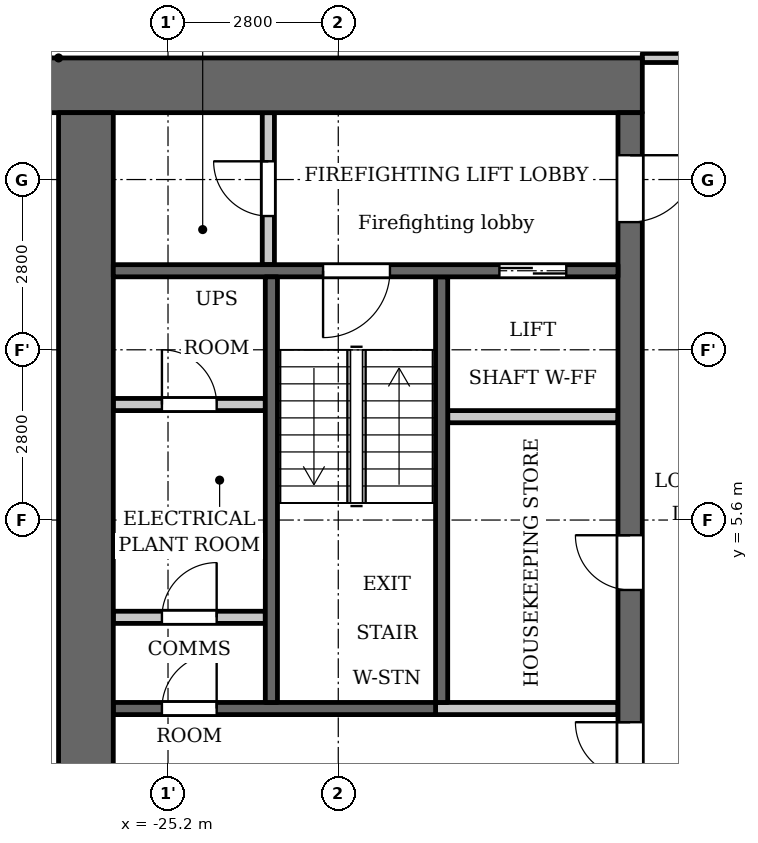
"""IFC4 building model, lengths in metres.
Left out: names, types, materials, properties, quantities, classifications, styles, units other than length and angle.
Written with IfcOpenShell. Run it as: python <this file> out.ifc"""

import sys

from ifc_helpers import new_model, si_unit, direction, frame, frame_2d, origin, place, context, subcontext, project, spatial, rectangle, extrude, element, fill, save


model = new_model("IFC4")
c1 = context("Model", 3, precision=1e-05, world=origin(), true_north=direction((0.0, 1.0)))
c2 = subcontext(c1, "Body", "Model", "MODEL_VIEW")
j1 = project(units=[si_unit("LENGTHUNIT", "METRE"), si_unit("PLANEANGLEUNIT", "RADIAN")], contexts=[c1])
p1 = place(None, origin())
s1 = spatial("IfcSite", under=j1, at=p1, CompositionType="ELEMENT")
p2 = place(p1, origin())
s2 = spatial("IfcBuilding", under=s1, at=p2, CompositionType="ELEMENT")
p3 = place(p2, frame((0.0, 0.0, 111.3)))
s3 = spatial("IfcBuildingStorey", under=s2, at=p3, CompositionType="ELEMENT", Elevation=111.3)
p4 = place(p3, frame((-20.7, 2.6, 0.0), z_axis=(0.0, 0.0, 1.0), x_axis=(0.0, 1.0, 0.0)))
e1 = element("IfcWall", 1, at=p4, inside=s3, PredefinedType="SHEAR", context=c2, shape_type="SweptSolid", body=[
    extrude(rectangle(XDim=7.0, YDim=0.2, at=frame_2d((3.5, 0.0))), origin(), (0.0, 0.0, 1.0), 3.2),
])
p5 = place(p3, frame((-20.8, 2.5, 0.0), z_axis=(0.0, 0.0, 1.0), x_axis=(-1.0, 0.0, 0.0)))
e2 = element("IfcWall", 2, at=p5, inside=s3, PredefinedType="SHEAR", context=c2, shape_type="SweptSolid", body=[
    extrude(rectangle(XDim=5.3, YDim=0.2, at=frame_2d((2.65, 0.0))), origin(), (0.0, 0.0, 1.0), 3.2),
])
p6 = place(p5, frame((3.6, 0.0, 0.0)))
e3 = element("IfcOpeningElement", 3, at=p6, cuts=e2, PredefinedType="OPENING", context=c2, shape_type="SweptSolid", body=[
    extrude(rectangle(XDim=0.9, YDim=2.1, at=frame_2d((0.45, 1.05))), frame((0.0, 0.11, 0.0), z_axis=(0.0, -1.0, 0.0), x_axis=(1.0, 0.0, 0.0)), (0.0, 0.0, 1.0), 0.22),
])
p7 = place(p3, frame((-17.4, 12.75, 0.0), z_axis=(0.0, 0.0, 1.0), x_axis=(-1.0, 0.0, 0.0)))
e4 = element("IfcWall", 4, at=p7, inside=s3, PredefinedType="SHEAR", context=c2, shape_type="SweptSolid", body=[
    extrude(rectangle(XDim=10.4, YDim=0.9, at=frame_2d((5.2, 0.0))), origin(), (0.0, 0.0, 1.0), 3.2),
])
p8 = place(p3, frame((-17.6, -12.3, 0.0), z_axis=(0.0, 0.0, 1.0), x_axis=(0.0, 1.0, 0.0)))
e5 = element("IfcWall", 5, at=p8, inside=s3, PredefinedType="SHEAR", context=c2, shape_type="SweptSolid", body=[
    extrude(rectangle(XDim=24.6, YDim=0.4, at=frame_2d((12.3, 0.0))), origin(), (0.0, 0.0, 1.0), 3.2),
])
p9 = place(p8, frame((6.0, 0.0, 0.0)))
e6 = element("IfcOpeningElement", 6, at=p9, cuts=e5, PredefinedType="OPENING", context=c2, shape_type="SweptSolid", body=[
    extrude(rectangle(XDim=1.1, YDim=2.1, at=frame_2d((0.55, 1.05))), frame((0.0, 0.21, 0.0), z_axis=(0.0, -1.0, 0.0), x_axis=(1.0, 0.0, 0.0)), (0.0, 0.0, 1.0), 0.42),
])
p10 = place(p8, frame((8.4, 0.0, 0.0)))
e7 = element("IfcOpeningElement", 7, at=p10, cuts=e5, PredefinedType="OPENING", context=c2, shape_type="SweptSolid", body=[
    extrude(rectangle(XDim=1.1, YDim=2.1, at=frame_2d((0.55, 1.05))), frame((0.0, 0.21, 0.0), z_axis=(0.0, -1.0, 0.0), x_axis=(1.0, 0.0, 0.0)), (0.0, 0.0, 1.0), 0.42),
])
p11 = place(p8, frame((10.8, 0.0, 0.0)))
e8 = element("IfcOpeningElement", 8, at=p11, cuts=e5, PredefinedType="OPENING", context=c2, shape_type="SweptSolid", body=[
    extrude(rectangle(XDim=1.1, YDim=2.1, at=frame_2d((0.55, 1.05))), frame((0.0, 0.21, 0.0), z_axis=(0.0, -1.0, 0.0), x_axis=(1.0, 0.0, 0.0)), (0.0, 0.0, 1.0), 0.42),
])
p12 = place(p8, frame((16.75, 0.0, 0.0)))
e9 = element("IfcOpeningElement", 9, at=p12, cuts=e5, PredefinedType="OPENING", context=c2, shape_type="SweptSolid", body=[
    extrude(rectangle(XDim=0.9, YDim=2.1, at=frame_2d((0.45, 1.05))), frame((0.0, 0.21, 0.0), z_axis=(0.0, -1.0, 0.0), x_axis=(1.0, 0.0, 0.0)), (0.0, 0.0, 1.0), 0.42),
])
p13 = place(p8, frame((22.8, 0.0, 0.0)))
e10 = element("IfcOpeningElement", 10, at=p13, cuts=e5, PredefinedType="OPENING", context=c2, shape_type="SweptSolid", body=[
    extrude(rectangle(XDim=1.1, YDim=2.1, at=frame_2d((0.55, 1.05))), frame((0.0, 0.21, 0.0), z_axis=(0.0, -1.0, 0.0), x_axis=(1.0, 0.0, 0.0)), (0.0, 0.0, 1.0), 0.42),
])
p14 = place(p8, frame((0.7, 0.0, 0.0)))
e11 = element("IfcOpeningElement", 11, at=p14, cuts=e5, PredefinedType="OPENING", context=c2, shape_type="SweptSolid", body=[
    extrude(rectangle(XDim=1.1, YDim=2.1, at=frame_2d((0.55, 1.05))), frame((0.0, 0.21, 0.0), z_axis=(0.0, -1.0, 0.0), x_axis=(1.0, 0.0, 0.0)), (0.0, 0.0, 1.0), 0.42),
])
p15 = place(p8, frame((12.775, 0.0, 0.0)))
e12 = element("IfcOpeningElement", 12, at=p15, cuts=e5, PredefinedType="OPENING", context=c2, shape_type="SweptSolid", body=[
    extrude(rectangle(XDim=1.8, YDim=2.1, at=frame_2d((0.9, 1.05))), frame((0.0, 0.21, 0.0), z_axis=(0.0, -1.0, 0.0), x_axis=(1.0, 0.0, 0.0)), (0.0, 0.0, 1.0), 0.42),
])
p16 = place(p3, frame((-26.55, -12.3, 0.0), z_axis=(0.0, 0.0, 1.0), x_axis=(0.0, 1.0, 0.0)))
e13 = element("IfcWall", 13, at=p16, inside=s3, PredefinedType="SHEAR", context=c2, shape_type="SweptSolid", body=[
    extrude(rectangle(XDim=24.6, YDim=0.9, at=frame_2d((12.3, 0.0))), origin(), (0.0, 0.0, 1.0), 3.2),
])
p17 = place(p3, frame((-23.55, 9.8, 0.0), z_axis=(0.0, 0.0, 1.0), x_axis=(0.0, 1.0, 0.0)))
e14 = element("IfcWall", 14, at=p17, inside=s3, PredefinedType="PARTITIONING", context=c2, shape_type="SweptSolid", body=[
    extrude(rectangle(XDim=2.5, YDim=0.2, at=frame_2d((1.25, 0.0))), origin(), (0.0, 0.0, 1.0), 3.2),
])
p18 = place(p17, frame((0.8, 0.0, 0.0)))
e15 = element("IfcOpeningElement", 15, at=p18, cuts=e14, PredefinedType="OPENING", context=c2, shape_type="SweptSolid", body=[
    extrude(rectangle(XDim=0.9, YDim=2.1, at=frame_2d((0.45, 1.05))), frame((0.0, 0.11, 0.0), z_axis=(0.0, -1.0, 0.0), x_axis=(1.0, 0.0, 0.0)), (0.0, 0.0, 1.0), 0.22),
])
p19 = place(p3, frame((-23.6, 4.0, 0.0), z_axis=(0.0, 0.0, 1.0), x_axis=(-1.0, 0.0, 0.0)))
e16 = element("IfcWall", 16, at=p19, inside=s3, PredefinedType="PARTITIONING", context=c2, shape_type="SweptSolid", body=[
    extrude(rectangle(XDim=2.5, YDim=0.2, at=frame_2d((1.25, 0.0))), origin(), (0.0, 0.0, 1.0), 3.2),
])
p20 = place(p19, frame((0.8, 0.0, 0.0)))
e17 = element("IfcOpeningElement", 17, at=p20, cuts=e16, PredefinedType="OPENING", context=c2, shape_type="SweptSolid", body=[
    extrude(rectangle(XDim=0.9, YDim=2.1, at=frame_2d((0.45, 1.05))), frame((0.0, 0.11, 0.0), z_axis=(0.0, -1.0, 0.0), x_axis=(1.0, 0.0, 0.0)), (0.0, 0.0, 1.0), 0.22),
])
p21 = place(p3, frame((-23.6, 7.5, 0.0), z_axis=(0.0, 0.0, 1.0), x_axis=(-1.0, 0.0, 0.0)))
e18 = element("IfcWall", 18, at=p21, inside=s3, PredefinedType="PARTITIONING", context=c2, shape_type="SweptSolid", body=[
    extrude(rectangle(XDim=2.5, YDim=0.2, at=frame_2d((1.25, 0.0))), origin(), (0.0, 0.0, 1.0), 3.2),
])
p22 = place(p21, frame((0.8, 0.0, 0.0)))
e19 = element("IfcOpeningElement", 19, at=p22, cuts=e18, PredefinedType="OPENING", context=c2, shape_type="SweptSolid", body=[
    extrude(rectangle(XDim=0.9, YDim=2.1, at=frame_2d((0.45, 1.05))), frame((0.0, 0.11, 0.0), z_axis=(0.0, -1.0, 0.0), x_axis=(1.0, 0.0, 0.0)), (0.0, 0.0, 1.0), 0.22),
])
p23 = place(p3, frame((-17.8, 2.5, 0.0), z_axis=(0.0, 0.0, 1.0), x_axis=(-1.0, 0.0, 0.0)))
e20 = element("IfcWall", 20, at=p23, inside=s3, PredefinedType="PARTITIONING", context=c2, shape_type="SweptSolid", body=[
    extrude(rectangle(XDim=3.0, YDim=0.2, at=frame_2d((1.5, 0.0))), origin(), (0.0, 0.0, 1.0), 3.2),
])
p24 = place(p3, frame((-17.8, 7.3, 0.0), z_axis=(0.0, 0.0, 1.0), x_axis=(-1.0, 0.0, 0.0)))
e21 = element("IfcWall", 21, at=p24, inside=s3, PredefinedType="PARTITIONING", context=c2, shape_type="SweptSolid", body=[
    extrude(rectangle(XDim=2.8, YDim=0.2, at=frame_2d((1.4, 0.0))), origin(), (0.0, 0.0, 1.0), 3.2),
])
p25 = place(p3, frame((-17.8, 9.7, 0.0), z_axis=(0.0, 0.0, 1.0), x_axis=(-1.0, 0.0, 0.0)))
e22 = element("IfcWall", 22, at=p25, inside=s3, PredefinedType="SHEAR", context=c2, shape_type="SweptSolid", body=[
    extrude(rectangle(XDim=8.3, YDim=0.2, at=frame_2d((4.15, 0.0))), origin(), (0.0, 0.0, 1.0), 3.2),
])
p26 = place(p25, frame((0.85, 0.0, 0.0)))
e23 = element("IfcOpeningElement", 23, at=p26, cuts=e22, PredefinedType="OPENING", context=c2, shape_type="SweptSolid", body=[
    extrude(rectangle(XDim=1.1, YDim=2.1, at=frame_2d((0.55, 1.05))), frame((0.0, 0.11, 0.0), z_axis=(0.0, -1.0, 0.0), x_axis=(1.0, 0.0, 0.0)), (0.0, 0.0, 1.0), 0.22),
])
p27 = place(p25, frame((3.75, 0.0, 0.0)))
e24 = element("IfcOpeningElement", 24, at=p27, cuts=e22, PredefinedType="OPENING", context=c2, shape_type="SweptSolid", body=[
    extrude(rectangle(XDim=1.1, YDim=2.1, at=frame_2d((0.55, 1.05))), frame((0.0, 0.11, 0.0), z_axis=(0.0, -1.0, 0.0), x_axis=(1.0, 0.0, 0.0)), (0.0, 0.0, 1.0), 0.22),
])
p28 = place(p3, frame((-23.5, 2.6, 0.0), z_axis=(0.0, 0.0, 1.0), x_axis=(0.0, 1.0, 0.0)))
e25 = element("IfcWall", 25, at=p28, inside=s3, PredefinedType="SHEAR", context=c2, shape_type="SweptSolid", body=[
    extrude(rectangle(XDim=7.0, YDim=0.2, at=frame_2d((3.5, 0.0))), origin(), (0.0, 0.0, 1.0), 3.2),
])
p29 = place(p3, frame((-17.4, 13.2, 0.0), z_axis=(0.0, 0.0, 1.0), x_axis=(1.0, 0.0, 0.0)))
e26 = element("IfcWall", 26, at=p29, inside=s3, PredefinedType="PARTITIONING", context=c2, shape_type="SweptSolid", body=[
    extrude(rectangle(XDim=34.8, YDim=0.15, at=frame_2d((17.4, 0.0))), origin(), (0.0, 0.0, 1.0), 3.2),
])
p30 = place(p29, frame((0.75, 0.0, 0.0)))
e27 = element("IfcOpeningElement", 27, at=p30, cuts=e26, PredefinedType="OPENING", context=c2, shape_type="SweptSolid", body=[
    extrude(rectangle(XDim=1.0, YDim=2.1, at=frame_2d((0.5, 1.05))), frame((0.0, 0.085, 0.0), z_axis=(0.0, -1.0, 0.0), x_axis=(1.0, 0.0, 0.0)), (0.0, 0.0, 1.0), 0.17),
])
p31 = place(p29, frame((33.15, 0.0, 0.0)))
e28 = element("IfcOpeningElement", 28, at=p31, cuts=e26, PredefinedType="OPENING", context=c2, shape_type="SweptSolid", body=[
    extrude(rectangle(XDim=1.0, YDim=2.1, at=frame_2d((0.5, 1.05))), frame((0.0, 0.085, 0.0), z_axis=(0.0, -1.0, 0.0), x_axis=(1.0, 0.0, 0.0)), (0.0, 0.0, 1.0), 0.17),
])
p32 = place(p29, frame((6.85, 0.0, 0.0)))
e29 = element("IfcOpeningElement", 29, at=p32, cuts=e26, PredefinedType="OPENING", context=c2, shape_type="SweptSolid", body=[
    extrude(rectangle(XDim=1.0, YDim=2.1, at=frame_2d((0.5, 1.05))), frame((0.0, 0.085, 0.0), z_axis=(0.0, -1.0, 0.0), x_axis=(1.0, 0.0, 0.0)), (0.0, 0.0, 1.0), 0.17),
])
p33 = place(p29, frame((12.45, 0.0, 0.0)))
e30 = element("IfcOpeningElement", 30, at=p33, cuts=e26, PredefinedType="OPENING", context=c2, shape_type="SweptSolid", body=[
    extrude(rectangle(XDim=1.0, YDim=2.1, at=frame_2d((0.5, 1.05))), frame((0.0, 0.085, 0.0), z_axis=(0.0, -1.0, 0.0), x_axis=(1.0, 0.0, 0.0)), (0.0, 0.0, 1.0), 0.17),
])
p34 = place(p29, frame((29.25, 0.0, 0.0)))
e31 = element("IfcOpeningElement", 31, at=p34, cuts=e26, PredefinedType="OPENING", context=c2, shape_type="SweptSolid", body=[
    extrude(rectangle(XDim=1.0, YDim=2.1, at=frame_2d((0.5, 1.05))), frame((0.0, 0.085, 0.0), z_axis=(0.0, -1.0, 0.0), x_axis=(1.0, 0.0, 0.0)), (0.0, 0.0, 1.0), 0.17),
])
p35 = place(p12, origin())
e32 = element("IfcDoor", 32, at=p35, inside=s3, OperationType="SINGLE_SWING_LEFT", PredefinedType="DOOR", context=c2, shape_type="SweptSolid", body=[
    extrude(rectangle(XDim=0.9, YDim=2.1, at=frame_2d((0.45, 1.05))), frame((0.0, 0.025, 0.0), z_axis=(0.0, -1.0, 0.0), x_axis=(1.0, 0.0, 0.0)), (0.0, 0.0, 1.0), 0.05),
])
fill(e9, e32)
p36 = place(p26, origin())
e33 = element("IfcDoor", 33, at=p36, inside=s3, OperationType="DOUBLE_DOOR_SLIDING", PredefinedType="DOOR", context=c2, shape_type="SweptSolid", body=[
    extrude(rectangle(XDim=1.1, YDim=2.1, at=frame_2d((0.55, 1.05))), frame((0.0, 0.025, 0.0), z_axis=(0.0, -1.0, 0.0), x_axis=(1.0, 0.0, 0.0)), (0.0, 0.0, 1.0), 0.05),
])
fill(e23, e33)
p37 = place(p13, origin())
e34 = element("IfcDoor", 34, at=p37, inside=s3, OperationType="SINGLE_SWING_RIGHT", PredefinedType="DOOR", context=c2, shape_type="SweptSolid", body=[
    extrude(rectangle(XDim=1.1, YDim=2.1, at=frame_2d((0.55, 1.05))), frame((0.0, 0.025, 0.0), z_axis=(0.0, -1.0, 0.0), x_axis=(1.0, 0.0, 0.0)), (0.0, 0.0, 1.0), 0.05),
])
fill(e10, e34)
p38 = place(p18, origin())
e35 = element("IfcDoor", 35, at=p38, inside=s3, OperationType="SINGLE_SWING_LEFT", PredefinedType="DOOR", context=c2, shape_type="SweptSolid", body=[
    extrude(rectangle(XDim=0.9, YDim=2.1, at=frame_2d((0.45, 1.05))), frame((0.0, 0.025, 0.0), z_axis=(0.0, -1.0, 0.0), x_axis=(1.0, 0.0, 0.0)), (0.0, 0.0, 1.0), 0.05),
])
fill(e15, e35)
p39 = place(p27, origin())
e36 = element("IfcDoor", 36, at=p39, inside=s3, OperationType="SINGLE_SWING_LEFT", PredefinedType="DOOR", context=c2, shape_type="SweptSolid", body=[
    extrude(rectangle(XDim=1.1, YDim=2.1, at=frame_2d((0.55, 1.05))), frame((0.0, 0.025, 0.0), z_axis=(0.0, -1.0, 0.0), x_axis=(1.0, 0.0, 0.0)), (0.0, 0.0, 1.0), 0.05),
])
fill(e24, e36)
p40 = place(p15, origin())
e37 = element("IfcDoor", 37, at=p40, inside=s3, OperationType="DOUBLE_DOOR_SINGLE_SWING", PredefinedType="DOOR", context=c2, shape_type="SweptSolid", body=[
    extrude(rectangle(XDim=1.8, YDim=2.1, at=frame_2d((0.9, 1.05))), frame((0.0, 0.025, 0.0), z_axis=(0.0, -1.0, 0.0), x_axis=(1.0, 0.0, 0.0)), (0.0, 0.0, 1.0), 0.05),
])
fill(e12, e37)
p41 = place(p20, origin())
e38 = element("IfcDoor", 38, at=p41, inside=s3, OperationType="SINGLE_SWING_LEFT", PredefinedType="DOOR", context=c2, shape_type="SweptSolid", body=[
    extrude(rectangle(XDim=0.9, YDim=2.1, at=frame_2d((0.45, 1.05))), frame((0.0, 0.025, 0.0), z_axis=(0.0, -1.0, 0.0), x_axis=(1.0, 0.0, 0.0)), (0.0, 0.0, 1.0), 0.05),
])
fill(e17, e38)
p42 = place(p22, origin())
e39 = element("IfcDoor", 39, at=p42, inside=s3, OperationType="SINGLE_SWING_RIGHT", PredefinedType="DOOR", context=c2, shape_type="SweptSolid", body=[
    extrude(rectangle(XDim=0.9, YDim=2.1, at=frame_2d((0.45, 1.05))), frame((0.0, 0.025, 0.0), z_axis=(0.0, -1.0, 0.0), x_axis=(1.0, 0.0, 0.0)), (0.0, 0.0, 1.0), 0.05),
])
fill(e19, e39)
p43 = place(p6, origin())
e40 = element("IfcDoor", 40, at=p43, inside=s3, OperationType="SINGLE_SWING_LEFT", PredefinedType="DOOR", context=c2, shape_type="SweptSolid", body=[
    extrude(rectangle(XDim=0.9, YDim=2.1, at=frame_2d((0.45, 1.05))), frame((0.0, 0.025, 0.0), z_axis=(0.0, -1.0, 0.0), x_axis=(1.0, 0.0, 0.0)), (0.0, 0.0, 1.0), 0.05),
])
fill(e3, e40)
save(model, sys.argv[1])
